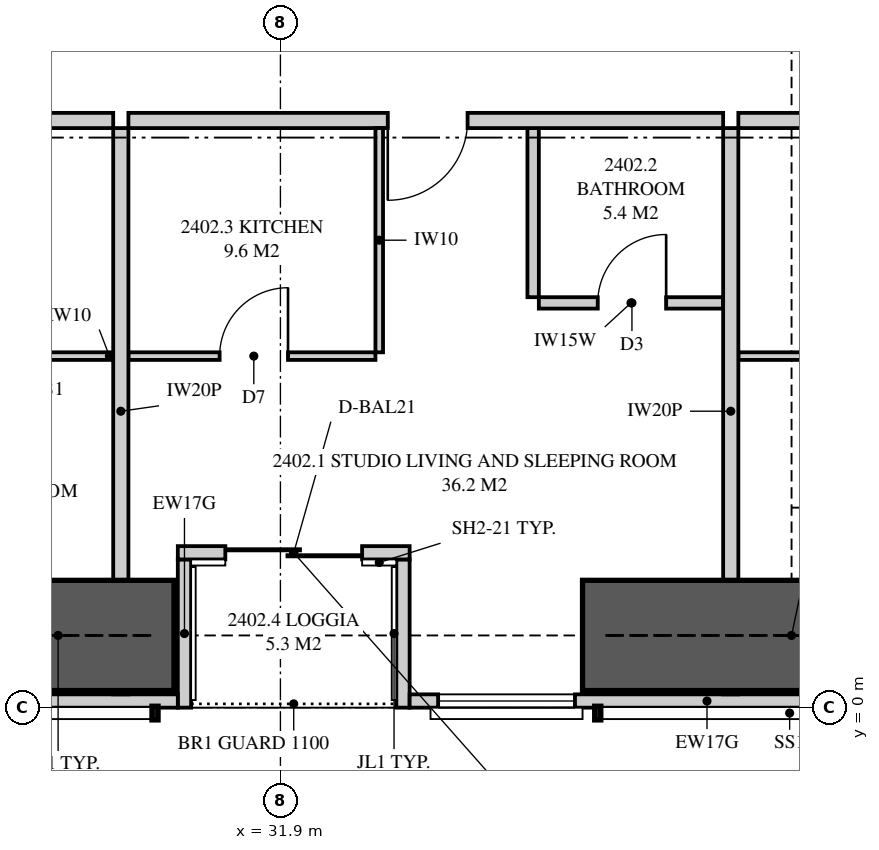
"""IFC4 building model, lengths in metres.
Left out: names, types, materials, properties, quantities, classifications, styles, units other than length and angle.
Written with IfcOpenShell. Run it as: python <this file> out.ifc"""

import sys

from ifc_helpers import new_model, si_unit, direction, frame, frame_2d, origin, place, context, subcontext, project, spatial, polyline, rectangle, outline, extrude, element, fill, save


model = new_model("IFC4")
c1 = context("Model", 3, precision=1e-05, world=origin(), true_north=direction((0.0, 1.0)))
c2 = subcontext(c1, "Body", "Model", "MODEL_VIEW")
j1 = project(units=[si_unit("LENGTHUNIT", "METRE"), si_unit("PLANEANGLEUNIT", "RADIAN")], contexts=[c1])
p1 = place(None, origin())
s1 = spatial("IfcSite", under=j1, at=p1, CompositionType="ELEMENT")
p2 = place(p1, origin())
s2 = spatial("IfcBuilding", under=s1, at=p2, CompositionType="ELEMENT")
p3 = place(p2, frame((0.0, 0.0, 91.45)))
s3 = spatial("IfcBuildingStorey", under=s2, at=p3, CompositionType="ELEMENT", Elevation=91.45)
p4 = place(p3, frame((24.875, 0.087, 0.0), z_axis=(0.0, 0.0, 1.0), x_axis=(1.0, 0.0, 0.0)))
e1 = element("IfcWall", 1, at=p4, inside=s3, PredefinedType="SOLIDWALL", context=c2, shape_type="SweptSolid", body=[
    extrude(rectangle(XDim=5.675, YDim=0.175, at=frame_2d((2.837, 0.0))), origin(), (0.0, 0.0, 1.0), 2.15),
])
p5 = place(p3, frame((33.6, 0.087, 0.0), z_axis=(0.0, 0.0, 1.0), x_axis=(1.0, 0.0, 0.0)))
e2 = element("IfcWall", 2, at=p5, inside=s3, PredefinedType="SOLIDWALL", context=c2, shape_type="SweptSolid", body=[
    extrude(outline(polyline([(0.0, 0.0), (7.825, 0.0), (7.825, 3.11), (5.228, 3.11), (5.228, 2.15), (5.183, 2.15), (5.183, 3.11), (5.025, 3.11), (5.025, 2.15), (0.0, 2.15), (0.0, 0.0)])), frame((0.0, 0.087, 0.0), z_axis=(0.0, -1.0, 0.0), x_axis=(1.0, 0.0, 0.0)), (0.0, 0.0, 1.0), 0.175),
])
p6 = place(p5, frame((0.375, 0.0, 0.4)))
e3 = element("IfcOpeningElement", 3, at=p6, cuts=e2, PredefinedType="OPENING", context=c2, shape_type="SweptSolid", body=[
    extrude(rectangle(XDim=1.8, YDim=1.7, at=frame_2d((0.9, 0.85))), frame((0.0, 0.097, 0.0), z_axis=(0.0, -1.0, 0.0), x_axis=(1.0, 0.0, 0.0)), (0.0, 0.0, 1.0), 0.195),
])
p7 = place(p3, frame((30.55, 2.038, 0.0), z_axis=(0.0, 0.0, 1.0), x_axis=(1.0, 0.0, 0.0)))
e4 = element("IfcWall", 4, at=p7, inside=s3, PredefinedType="SOLIDWALL", context=c2, shape_type="SweptSolid", body=[
    extrude(rectangle(XDim=3.05, YDim=0.175, at=frame_2d((1.525, 0.0))), origin(), (0.0, 0.0, 1.0), 3.11),
])
p8 = place(p7, frame((0.625, 0.0, 0.0)))
e5 = element("IfcOpeningElement", 5, at=p8, cuts=e4, PredefinedType="OPENING", context=c2, shape_type="SweptSolid", body=[
    extrude(rectangle(XDim=1.8, YDim=2.1, at=frame_2d((0.9, 1.05))), frame((0.0, 0.097, 0.0), z_axis=(0.0, -1.0, 0.0), x_axis=(1.0, 0.0, 0.0)), (0.0, 0.0, 1.0), 0.195),
])
for number, where, z_axis, x_axis in (
    (6, (30.637, 0.0, 0.0), (0.0, 0.0, 1.0), (0.0, 1.0, 0.0)),
    (7, (33.512, 0.0, 0.0), (0.0, 0.0, 1.0), (0.0, 1.0, 0.0)),
):
    element("IfcWall", number, at=place(p3, frame(where, z_axis=z_axis, x_axis=x_axis)), inside=s3, PredefinedType="SOLIDWALL", context=c2, shape_type="SweptSolid", body=[
        extrude(outline(polyline([(0.0, 0.0), (1.95, 0.0), (1.95, 3.11), (1.75, 3.11), (1.75, 2.15), (0.15, 2.15), (0.15, 3.11), (0.0, 3.11), (0.0, 0.0)])), frame((0.0, 0.087, 0.0), z_axis=(0.0, -1.0, 0.0), x_axis=(1.0, 0.0, 0.0)), (0.0, 0.0, 1.0), 0.175),
    ])
p9 = place(p3, frame((29.8, 0.175, 0.0), z_axis=(0.0, 0.0, 1.0), x_axis=(0.0, 1.0, 0.0)))
e8 = element("IfcWall", 8, at=p9, inside=s3, PredefinedType="PARTITIONING", context=c2, shape_type="SweptSolid", body=[
    extrude(outline(polyline([(0.529, 2.15), (0.0, 2.15), (0.0, 0.0), (0.529, 0.0), (0.529, 0.103), (1.021, 0.103), (1.021, 0.0), (7.45, 0.0), (7.45, 3.11), (1.685, 3.11), (1.685, 2.15), (1.021, 2.15), (1.021, 2.047), (0.529, 2.047), (0.529, 2.15)])), frame((0.0, 0.1, 0.0), z_axis=(0.0, -1.0, 0.0), x_axis=(1.0, 0.0, 0.0)), (0.0, 0.0, 1.0), 0.2),
])
p10 = place(p3, frame((26.15, 4.625, 0.0), z_axis=(0.0, 0.0, 1.0), x_axis=(1.0, 0.0, 0.0)))
e9 = element("IfcWall", 9, at=p10, inside=s3, PredefinedType="PARTITIONING", context=c2, shape_type="SweptSolid", body=[
    extrude(outline(polyline([(0.0, 0.0), (3.55, 0.0), (3.55, 3.11), (1.887, 3.11), (1.887, 2.541), (1.312, 2.541), (1.312, 3.11), (0.0, 3.11), (0.0, 0.0)])), frame((0.0, 0.05, 0.0), z_axis=(0.0, -1.0, 0.0), x_axis=(1.0, 0.0, 0.0)), (0.0, 0.0, 1.0), 0.1),
])
p11 = place(p10, frame((1.3, 0.0, 0.0)))
e10 = element("IfcOpeningElement", 10, at=p11, cuts=e9, PredefinedType="OPENING", context=c2, shape_type="SweptSolid", body=[
    extrude(rectangle(XDim=0.9, YDim=2.1, at=frame_2d((0.45, 1.05))), frame((0.0, 0.06, 0.0), z_axis=(0.0, -1.0, 0.0), x_axis=(1.0, 0.0, 0.0)), (0.0, 0.0, 1.0), 0.12),
])
p12 = place(p3, frame((37.825, 0.175, 0.0), z_axis=(0.0, 0.0, 1.0), x_axis=(0.0, 1.0, 0.0)))
e11 = element("IfcWall", 11, at=p12, inside=s3, PredefinedType="PARTITIONING", context=c2, shape_type="SweptSolid", body=[
    extrude(outline(polyline([(0.529, 2.15), (0.0, 2.15), (0.0, 0.0), (0.529, 0.0), (0.529, 0.957), (1.021, 0.957), (1.021, 0.0), (7.45, 0.0), (7.45, 3.11), (1.685, 3.11), (1.685, 2.15), (1.021, 2.15), (1.021, 1.193), (0.529, 1.193), (0.529, 2.15)])), frame((0.0, 0.1, 0.0), z_axis=(0.0, -1.0, 0.0), x_axis=(1.0, 0.0, 0.0)), (0.0, 0.0, 1.0), 0.2),
])
p13 = place(p3, frame((29.9, 7.725, 0.0), z_axis=(0.0, 0.0, 1.0), x_axis=(1.0, 0.0, 0.0)))
e12 = element("IfcWall", 12, at=p13, inside=s3, PredefinedType="PARTITIONING", context=c2, shape_type="SweptSolid", body=[
    extrude(rectangle(XDim=7.825, YDim=0.2, at=frame_2d((3.913, 0.0))), origin(), (0.0, 0.0, 1.0), 3.11),
])
p14 = place(p13, frame((3.413, 0.0, 0.0)))
e13 = element("IfcOpeningElement", 13, at=p14, cuts=e12, PredefinedType="OPENING", context=c2, shape_type="SweptSolid", body=[
    extrude(rectangle(XDim=1.05, YDim=2.2, at=frame_2d((0.525, 1.1))), frame((0.0, 0.11, 0.0), z_axis=(0.0, -1.0, 0.0), x_axis=(1.0, 0.0, 0.0)), (0.0, 0.0, 1.0), 0.22),
])
p15 = place(p3, frame((35.3, 5.325, 0.0), z_axis=(0.0, 0.0, 1.0), x_axis=(1.0, 0.0, 0.0)))
e14 = element("IfcWall", 14, at=p15, inside=s3, PredefinedType="PLUMBINGWALL", context=c2, shape_type="SweptSolid", body=[
    extrude(rectangle(XDim=2.425, YDim=0.15, at=frame_2d((1.212, 0.0))), origin(), (0.0, 0.0, 1.0), 3.11),
])
p16 = place(p15, frame((0.775, 0.0, 0.0)))
e15 = element("IfcOpeningElement", 15, at=p16, cuts=e14, PredefinedType="OPENING", context=c2, shape_type="SweptSolid", body=[
    extrude(rectangle(XDim=0.9, YDim=2.1, at=frame_2d((0.45, 1.05))), frame((0.0, 0.085, 0.0), z_axis=(0.0, -1.0, 0.0), x_axis=(1.0, 0.0, 0.0)), (0.0, 0.0, 1.0), 0.17),
])
p17 = place(p3, frame((35.225, 5.4, 0.0), z_axis=(0.0, 0.0, 1.0), x_axis=(0.0, 1.0, 0.0)))
e16 = element("IfcWall", 16, at=p17, inside=s3, PredefinedType="PLUMBINGWALL", context=c2, shape_type="SweptSolid", body=[
    extrude(rectangle(XDim=2.225, YDim=0.15, at=frame_2d((1.113, 0.0))), origin(), (0.0, 0.0, 1.0), 3.11),
])
p18 = place(p3, frame((29.9, 4.625, 0.0), z_axis=(0.0, 0.0, 1.0), x_axis=(1.0, 0.0, 0.0)))
e17 = element("IfcWall", 17, at=p18, inside=s3, PredefinedType="PARTITIONING", context=c2, shape_type="SweptSolid", body=[
    extrude(rectangle(XDim=3.25, YDim=0.1, at=frame_2d((1.625, 0.0))), origin(), (0.0, 0.0, 1.0), 3.11),
])
p19 = place(p18, frame((1.2, 0.0, 0.0)))
e18 = element("IfcOpeningElement", 18, at=p19, cuts=e17, PredefinedType="OPENING", context=c2, shape_type="SweptSolid", body=[
    extrude(rectangle(XDim=0.9, YDim=2.1, at=frame_2d((0.45, 1.05))), frame((0.0, 0.06, 0.0), z_axis=(0.0, -1.0, 0.0), x_axis=(1.0, 0.0, 0.0)), (0.0, 0.0, 1.0), 0.12),
])
p20 = place(p3, frame((33.2, 4.675, 0.0), z_axis=(0.0, 0.0, 1.0), x_axis=(0.0, 1.0, 0.0)))
e19 = element("IfcWall", 19, at=p20, inside=s3, PredefinedType="PARTITIONING", context=c2, shape_type="SweptSolid", body=[
    extrude(rectangle(XDim=2.95, YDim=0.1, at=frame_2d((1.475, 0.0))), origin(), (0.0, 0.0, 1.0), 3.11),
])
p21 = place(p3, frame((37.925, 7.725, 0.0), z_axis=(0.0, 0.0, 1.0), x_axis=(1.0, 0.0, 0.0)))
e20 = element("IfcWall", 20, at=p21, inside=s3, PredefinedType="PARTITIONING", context=c2, shape_type="SweptSolid", body=[
    extrude(outline(polyline([(0.0, 0.0), (8.1, 0.0), (8.1, 3.11), (1.037, 3.11), (1.037, 2.541), (0.363, 2.541), (0.363, 3.11), (0.0, 3.11), (0.0, 0.0)])), frame((0.0, 0.1, 0.0), z_axis=(0.0, -1.0, 0.0), x_axis=(1.0, 0.0, 0.0)), (0.0, 0.0, 1.0), 0.2),
])
p22 = place(p21, frame((2.4, 0.0, 0.0)))
e21 = element("IfcOpeningElement", 21, at=p22, cuts=e20, PredefinedType="OPENING", context=c2, shape_type="SweptSolid", body=[
    extrude(rectangle(XDim=1.05, YDim=2.2, at=frame_2d((0.525, 1.1))), frame((0.0, 0.11, 0.0), z_axis=(0.0, -1.0, 0.0), x_axis=(1.0, 0.0, 0.0)), (0.0, 0.0, 1.0), 0.22),
])
p23 = place(p3, frame((37.925, 4.625, 0.0), z_axis=(0.0, 0.0, 1.0), x_axis=(1.0, 0.0, 0.0)))
e22 = element("IfcWall", 22, at=p23, inside=s3, PredefinedType="PARTITIONING", context=c2, shape_type="SweptSolid", body=[
    extrude(outline(polyline([(0.0, 0.0), (3.55, 0.0), (3.55, 3.11), (0.987, 3.11), (0.987, 2.541), (0.413, 2.541), (0.413, 3.11), (0.0, 3.11), (0.0, 0.0)])), frame((0.0, 0.05, 0.0), z_axis=(0.0, -1.0, 0.0), x_axis=(1.0, 0.0, 0.0)), (0.0, 0.0, 1.0), 0.1),
])
p24 = place(p23, frame((1.35, 0.0, 0.0)))
e23 = element("IfcOpeningElement", 23, at=p24, cuts=e22, PredefinedType="OPENING", context=c2, shape_type="SweptSolid", body=[
    extrude(rectangle(XDim=0.9, YDim=2.1, at=frame_2d((0.45, 1.05))), frame((0.0, 0.06, 0.0), z_axis=(0.0, -1.0, 0.0), x_axis=(1.0, 0.0, 0.0)), (0.0, 0.0, 1.0), 0.12),
])
p25 = place(p3, frame((24.9, 7.725, 0.0), z_axis=(0.0, 0.0, 1.0), x_axis=(1.0, 0.0, 0.0)))
e24 = element("IfcWall", 24, at=p25, inside=s3, PredefinedType="PARTITIONING", context=c2, shape_type="SweptSolid", body=[
    extrude(outline(polyline([(0.0, 0.0), (4.8, 0.0), (4.8, 3.11), (3.187, 3.11), (3.187, 2.541), (2.513, 2.541), (2.513, 3.11), (0.0, 3.11), (0.0, 0.0)])), frame((0.0, 0.1, 0.0), z_axis=(0.0, -1.0, 0.0), x_axis=(1.0, 0.0, 0.0)), (0.0, 0.0, 1.0), 0.2),
])
for number, where, z_axis, x_axis in (
    (25, (25.0, 0.95, 0.0), (0.0, 0.0, 1.0), (1.0, 0.0, 0.0)),
    (26, (35.875, 0.95, 0.0), (0.0, 0.0, 1.0), (1.0, 0.0, 0.0)),
):
    element("IfcWall", number, at=place(p3, frame(where, z_axis=z_axis, x_axis=x_axis)), inside=s3, PredefinedType="SHEAR", context=c2, shape_type="SweptSolid", body=[
        extrude(rectangle(XDim=5.5, YDim=1.45, at=frame_2d((2.75, 0.0))), origin(), (0.0, 0.0, 1.0), 3.35),
    ])
p26 = place(p8, origin())
e27 = element("IfcDoor", 27, at=p26, inside=s3, OperationType="SLIDING_TO_LEFT", PredefinedType="DOOR", context=c2, shape_type="SweptSolid", body=[
    extrude(rectangle(XDim=1.8, YDim=2.1, at=frame_2d((0.9, 1.05))), frame((0.0, 0.025, 0.0), z_axis=(0.0, -1.0, 0.0), x_axis=(1.0, 0.0, 0.0)), (0.0, 0.0, 1.0), 0.05),
])
fill(e5, e27)
p27 = place(p6, origin())
e28 = element("IfcWindow", 28, at=p27, inside=s3, PartitioningType="SINGLE_PANEL", PredefinedType="WINDOW", context=c2, shape_type="SweptSolid", body=[
    extrude(rectangle(XDim=1.8, YDim=1.7, at=frame_2d((0.9, 0.85))), frame((0.0, 0.03, 0.0), z_axis=(0.0, -1.0, 0.0), x_axis=(1.0, 0.0, 0.0)), (0.0, 0.0, 1.0), 0.06),
])
fill(e3, e28)
p28 = place(p14, frame((1.05, 0.0, 0.0), z_axis=(0.0, 0.0, 1.0), x_axis=(-1.0, 0.0, 0.0)))
e29 = element("IfcDoor", 29, at=p28, inside=s3, OperationType="SINGLE_SWING_RIGHT", PredefinedType="DOOR", context=c2, shape_type="SweptSolid", body=[
    extrude(rectangle(XDim=1.05, YDim=2.2, at=frame_2d((0.525, 1.1))), frame((0.0, 0.025, 0.0), z_axis=(0.0, -1.0, 0.0), x_axis=(1.0, 0.0, 0.0)), (0.0, 0.0, 1.0), 0.05),
])
fill(e13, e29)
p29 = place(p16, origin())
e30 = element("IfcDoor", 30, at=p29, inside=s3, OperationType="SINGLE_SWING_RIGHT", PredefinedType="DOOR", context=c2, shape_type="SweptSolid", body=[
    extrude(rectangle(XDim=0.9, YDim=2.1, at=frame_2d((0.45, 1.05))), frame((0.0, 0.025, 0.0), z_axis=(0.0, -1.0, 0.0), x_axis=(1.0, 0.0, 0.0)), (0.0, 0.0, 1.0), 0.05),
])
fill(e15, e30)
p30 = place(p19, origin())
e31 = element("IfcDoor", 31, at=p30, inside=s3, OperationType="SINGLE_SWING_RIGHT", PredefinedType="DOOR", context=c2, shape_type="SweptSolid", body=[
    extrude(rectangle(XDim=0.9, YDim=2.1, at=frame_2d((0.45, 1.05))), frame((0.0, 0.025, 0.0), z_axis=(0.0, -1.0, 0.0), x_axis=(1.0, 0.0, 0.0)), (0.0, 0.0, 1.0), 0.05),
])
fill(e18, e31)
save(model, sys.argv[1])
